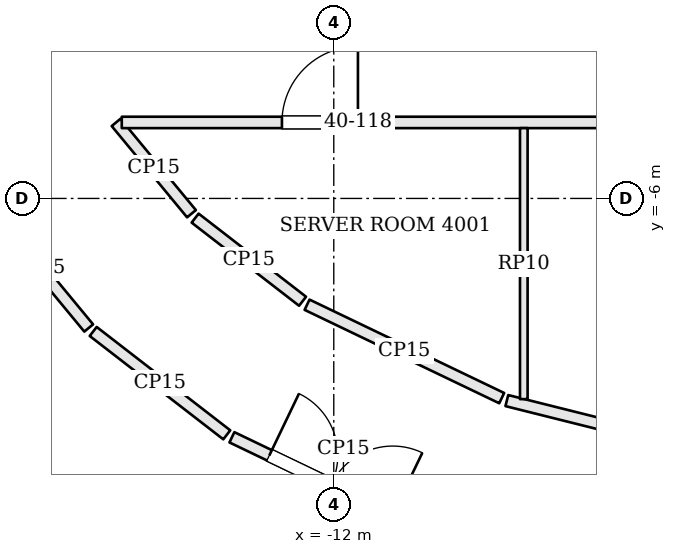
"""IFC4 building model, lengths in metres.
Left out: names, types, materials, properties, quantities, classifications, styles, units other than length and angle.
Written with IfcOpenShell. Run it as: python <this file> out.ifc"""

import sys

from ifc_helpers import new_model, si_unit, direction, frame, frame_2d, origin, place, context, subcontext, project, spatial, rectangle, extrude, element, fill, save


model = new_model("IFC4")
c1 = context("Model", 3, precision=1e-05, world=origin(), true_north=direction((0.0, 1.0)))
c2 = subcontext(c1, "Body", "Model", "MODEL_VIEW")
j1 = project(units=[si_unit("LENGTHUNIT", "METRE"), si_unit("PLANEANGLEUNIT", "RADIAN")], contexts=[c1])
p1 = place(None, origin())
s1 = spatial("IfcSite", under=j1, at=p1, CompositionType="ELEMENT")
p2 = place(p1, origin())
s2 = spatial("IfcBuilding", under=s1, at=p2, CompositionType="ELEMENT")
p3 = place(p2, frame((0.0, 0.0, 165.6)))
s3 = spatial("IfcBuildingStorey", under=s2, at=p3, CompositionType="ELEMENT", Elevation=165.6)
p4 = place(p3, frame((-16.523, -6.132, 0.0), z_axis=(0.0, 0.0, 1.0), x_axis=(0.636763898907, -0.771058841496, 0.0)))
e1 = element("IfcWall", 1, at=p4, inside=s3, PredefinedType="PARTITIONING", context=c2, shape_type="SweptSolid", body=[
    extrude(rectangle(XDim=2.04, YDim=0.15, at=frame_2d((1.02, 0.0))), origin(), (0.0, 0.0, 1.0), 3.098),
])
p5 = place(p3, frame((-15.165, -7.75, 0.0), z_axis=(0.0, 0.0, 1.0), x_axis=(0.790917548929, -0.611922732701, 0.0)))
e2 = element("IfcWall", 2, at=p5, inside=s3, PredefinedType="PARTITIONING", context=c2, shape_type="SweptSolid", body=[
    extrude(rectangle(XDim=2.222, YDim=0.15, at=frame_2d((1.111, 0.0))), origin(), (0.0, 0.0, 1.0), 3.098),
])
p6 = place(p3, frame((-13.34, -9.142, 0.0), z_axis=(0.0, 0.0, 1.0), x_axis=(0.901599124721, -0.432572558425, 0.0)))
e3 = element("IfcWall", 3, at=p6, inside=s3, PredefinedType="PARTITIONING", context=c2, shape_type="SweptSolid", body=[
    extrude(rectangle(XDim=3.255, YDim=0.15, at=frame_2d((1.627, 0.0))), origin(), (0.0, 0.0, 1.0), 3.098),
])
p7 = place(p6, frame((0.547, 0.0, 0.0)))
e4 = element("IfcOpeningElement", 4, at=p7, cuts=e3, PredefinedType="OPENING", context=c2, shape_type="SweptSolid", body=[
    extrude(rectangle(XDim=1.8, YDim=2.1, at=frame_2d((0.9, 1.05))), frame((0.0, 0.085, 0.0), z_axis=(0.0, -1.0, 0.0), x_axis=(1.0, 0.0, 0.0)), (0.0, 0.0, 1.0), 0.17),
])
p8 = place(p3, frame((-6.001, -9.591, 0.0), z_axis=(0.0, 0.0, 1.0), x_axis=(-0.970063855769, 0.242849986061, 0.0)))
e5 = element("IfcWall", 5, at=p8, inside=s3, PredefinedType="PARTITIONING", context=c2, shape_type="SweptSolid", body=[
    extrude(rectangle(XDim=3.837, YDim=0.15, at=frame_2d((1.919, 0.0))), origin(), (0.0, 0.0, 1.0), 3.098),
])
p9 = place(p3, frame((-9.791, -8.627, 0.0), z_axis=(0.0, 0.0, 1.0), x_axis=(-0.901598165215, 0.432574558292, 0.0)))
e6 = element("IfcWall", 6, at=p9, inside=s3, PredefinedType="PARTITIONING", context=c2, shape_type="SweptSolid", body=[
    extrude(rectangle(XDim=2.84, YDim=0.15, at=frame_2d((1.42, 0.0))), origin(), (0.0, 0.0, 1.0), 3.098),
])
p10 = place(p3, frame((-12.411, -7.353, 0.0), z_axis=(0.0, 0.0, 1.0), x_axis=(-0.790894311556, 0.611952766109, 0.0)))
e7 = element("IfcWall", 7, at=p10, inside=s3, PredefinedType="PARTITIONING", context=c2, shape_type="SweptSolid", body=[
    extrude(rectangle(XDim=1.787, YDim=0.15, at=frame_2d((0.894, 0.0))), origin(), (0.0, 0.0, 1.0), 3.098),
])
p11 = place(p3, frame((-13.872, -6.201, 0.0), z_axis=(0.0, 0.0, 1.0), x_axis=(-0.636832838855, 0.771001903601, 0.0)))
e8 = element("IfcWall", 8, at=p11, inside=s3, PredefinedType="PARTITIONING", context=c2, shape_type="SweptSolid", body=[
    extrude(rectangle(XDim=1.558, YDim=0.15, at=frame_2d((0.779, 0.0))), origin(), (0.0, 0.0, 1.0), 3.098),
])
p12 = place(p3, frame((-14.789, -5.0, 0.0), z_axis=(0.0, 0.0, 1.0), x_axis=(1.0, 0.0, 0.0)))
e9 = element("IfcWall", 9, at=p12, inside=s3, PredefinedType="PARTITIONING", context=c2, shape_type="SweptSolid", body=[
    extrude(rectangle(XDim=29.562, YDim=0.15, at=frame_2d((14.781, 0.0))), origin(), (0.0, 0.0, 1.0), 3.098),
])
p13 = place(p12, frame((2.107, 0.0, 0.0)))
e10 = element("IfcOpeningElement", 10, at=p13, cuts=e9, PredefinedType="OPENING", context=c2, shape_type="SweptSolid", body=[
    extrude(rectangle(XDim=1.0, YDim=2.1, at=frame_2d((0.5, 1.05))), frame((0.0, 0.085, 0.0), z_axis=(0.0, -1.0, 0.0), x_axis=(1.0, 0.0, 0.0)), (0.0, 0.0, 1.0), 0.17),
])
p14 = place(p12, frame((13.889, 0.0, 0.0)))
e11 = element("IfcOpeningElement", 11, at=p14, cuts=e9, PredefinedType="OPENING", context=c2, shape_type="SweptSolid", body=[
    extrude(rectangle(XDim=1.8, YDim=2.1, at=frame_2d((0.9, 1.05))), frame((0.0, 0.085, 0.0), z_axis=(0.0, -1.0, 0.0), x_axis=(1.0, 0.0, 0.0)), (0.0, 0.0, 1.0), 0.17),
])
p15 = place(p12, frame((26.463, 0.0, 0.0)))
e12 = element("IfcOpeningElement", 12, at=p15, cuts=e9, PredefinedType="OPENING", context=c2, shape_type="SweptSolid", body=[
    extrude(rectangle(XDim=1.0, YDim=2.4, at=frame_2d((0.5, 1.2))), frame((0.0, 0.085, 0.0), z_axis=(0.0, -1.0, 0.0), x_axis=(1.0, 0.0, 0.0)), (0.0, 0.0, 1.0), 0.17),
])
p16 = place(p3, frame((-9.5, -8.64, 0.0), z_axis=(0.0, 0.0, 1.0), x_axis=(0.0, 1.0, 0.0)))
e13 = element("IfcWall", 13, at=p16, inside=s3, PredefinedType="PARTITIONING", context=c2, shape_type="SweptSolid", body=[
    extrude(rectangle(XDim=3.565, YDim=0.1, at=frame_2d((1.783, 0.0))), origin(), (0.0, 0.0, 1.0), 3.084),
])
p17 = place(p7, origin())
e14 = element("IfcDoor", 14, at=p17, inside=s3, OperationType="DOUBLE_DOOR_SINGLE_SWING", PredefinedType="DOOR", context=c2, shape_type="SweptSolid", body=[
    extrude(rectangle(XDim=1.8, YDim=2.1, at=frame_2d((0.9, 1.05))), frame((0.0, 0.025, 0.0), z_axis=(0.0, -1.0, 0.0), x_axis=(1.0, 0.0, 0.0)), (0.0, 0.0, 1.0), 0.05),
])
fill(e4, e14)
p18 = place(p13, origin())
e15 = element("IfcDoor", 15, at=p18, inside=s3, OperationType="SINGLE_SWING_RIGHT", PredefinedType="DOOR", context=c2, shape_type="SweptSolid", body=[
    extrude(rectangle(XDim=1.0, YDim=2.1, at=frame_2d((0.5, 1.05))), frame((0.0, 0.025, 0.0), z_axis=(0.0, -1.0, 0.0), x_axis=(1.0, 0.0, 0.0)), (0.0, 0.0, 1.0), 0.05),
])
fill(e10, e15)
save(model, sys.argv[1])
